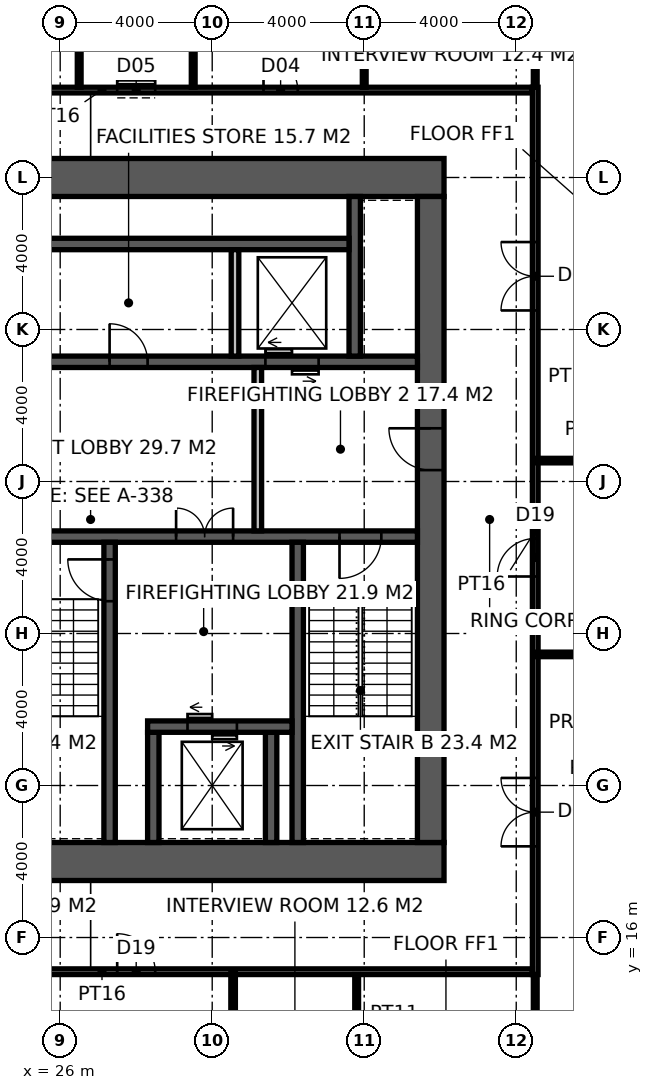
"""IFC4 building model, lengths in metres.
Left out: names, types, materials, properties, quantities, classifications, styles, units other than length and angle.
Written with IfcOpenShell. Run it as: python <this file> out.ifc"""

import sys

from ifc_helpers import new_model, si_unit, direction, frame, frame_2d, origin, place, context, subcontext, project, spatial, rectangle, extrude, element, fill, save


model = new_model("IFC4")
c1 = context("Model", 3, precision=1e-05, world=origin(), true_north=direction((0.0, 1.0)))
c2 = subcontext(c1, "Body", "Model", "MODEL_VIEW")
j1 = project(units=[si_unit("LENGTHUNIT", "METRE"), si_unit("PLANEANGLEUNIT", "RADIAN")], contexts=[c1])
p1 = place(None, origin())
s1 = spatial("IfcSite", under=j1, at=p1, CompositionType="ELEMENT")
p2 = place(p1, origin())
s2 = spatial("IfcBuilding", under=s1, at=p2, CompositionType="ELEMENT")
p3 = place(p2, frame((0.0, 0.0, 238.2)))
s3 = spatial("IfcBuildingStorey", under=s2, at=p3, CompositionType="ELEMENT", Elevation=238.2)
p4 = place(p3, frame((18.5, 18.0, -0.15), z_axis=(0.0, 0.0, 1.0), x_axis=(1.0, 0.0, 0.0)))
e1 = element("IfcWall", 1, at=p4, inside=s3, PredefinedType="SHEAR", context=c2, shape_type="SweptSolid", body=[
    extrude(rectangle(XDim=17.6, YDim=1.0, at=frame_2d((8.8, 0.0))), origin(), (0.0, 0.0, 1.0), 4.0),
])
p5 = place(p4, frame((3.45, 0.0, 0.15)))
e2 = element("IfcOpeningElement", 2, at=p5, cuts=e1, PredefinedType="OPENING", context=c2, shape_type="SweptSolid", body=[
    extrude(rectangle(XDim=1.5, YDim=2.4, at=frame_2d((0.75, 1.2))), frame((0.0, 0.51, 0.0), z_axis=(0.0, -1.0, 0.0), x_axis=(1.0, 0.0, 0.0)), (0.0, 0.0, 1.0), 1.02),
])
p6 = place(p3, frame((18.5, 36.0, -0.15), z_axis=(0.0, 0.0, 1.0), x_axis=(1.0, 0.0, 0.0)))
e3 = element("IfcWall", 3, at=p6, inside=s3, PredefinedType="SHEAR", context=c2, shape_type="SweptSolid", body=[
    extrude(rectangle(XDim=17.6, YDim=1.0, at=frame_2d((8.8, 0.0))), origin(), (0.0, 0.0, 1.0), 4.0),
])
p7 = place(p3, frame((35.75, 18.5, -0.15), z_axis=(0.0, 0.0, 1.0), x_axis=(0.0, 1.0, 0.0)))
e4 = element("IfcWall", 4, at=p7, inside=s3, PredefinedType="SHEAR", context=c2, shape_type="SweptSolid", body=[
    extrude(rectangle(XDim=17.0, YDim=0.7, at=frame_2d((8.5, 0.0))), origin(), (0.0, 0.0, 1.0), 4.0),
])
p8 = place(p7, frame((9.8, 0.0, 0.15)))
e5 = element("IfcOpeningElement", 5, at=p8, cuts=e4, PredefinedType="OPENING", context=c2, shape_type="SweptSolid", body=[
    extrude(rectangle(XDim=1.1, YDim=2.2, at=frame_2d((0.55, 1.1))), frame((0.0, 0.36, 0.0), z_axis=(0.0, -1.0, 0.0), x_axis=(1.0, 0.0, 0.0)), (0.0, 0.0, 1.0), 0.72),
])
p9 = place(p3, frame((24.15, 26.55, -0.15), z_axis=(0.0, 0.0, 1.0), x_axis=(1.0, 0.0, 0.0)))
e6 = element("IfcWall", 6, at=p9, inside=s3, PredefinedType="SHEAR", context=c2, shape_type="SweptSolid", body=[
    extrude(rectangle(XDim=11.25, YDim=0.3, at=frame_2d((5.625, 0.0))), origin(), (0.0, 0.0, 1.0), 4.0),
])
p10 = place(p9, frame((9.2, 0.0, 0.15)))
e7 = element("IfcOpeningElement", 7, at=p10, cuts=e6, PredefinedType="OPENING", context=c2, shape_type="SweptSolid", body=[
    extrude(rectangle(XDim=1.1, YDim=2.2, at=frame_2d((0.55, 1.1))), frame((0.0, 0.16, 0.0), z_axis=(0.0, -1.0, 0.0), x_axis=(1.0, 0.0, 0.0)), (0.0, 0.0, 1.0), 0.32),
])
p11 = place(p9, frame((4.9, 0.0, 0.15)))
e8 = element("IfcOpeningElement", 8, at=p11, cuts=e6, PredefinedType="OPENING", context=c2, shape_type="SweptSolid", body=[
    extrude(rectangle(XDim=1.5, YDim=2.4, at=frame_2d((0.75, 1.2))), frame((0.0, 0.16, 0.0), z_axis=(0.0, -1.0, 0.0), x_axis=(1.0, 0.0, 0.0)), (0.0, 0.0, 1.0), 0.32),
])
p12 = place(p3, frame((27.3, 18.5, -0.15), z_axis=(0.0, 0.0, 1.0), x_axis=(0.0, 1.0, 0.0)))
e9 = element("IfcWall", 9, at=p12, inside=s3, PredefinedType="SHEAR", context=c2, shape_type="SweptSolid", body=[
    extrude(rectangle(XDim=7.9, YDim=0.3, at=frame_2d((3.95, 0.0))), origin(), (0.0, 0.0, 1.0), 4.0),
])
p13 = place(p12, frame((6.35, 0.0, 0.15)))
e10 = element("IfcOpeningElement", 10, at=p13, cuts=e9, PredefinedType="OPENING", context=c2, shape_type="SweptSolid", body=[
    extrude(rectangle(XDim=1.1, YDim=2.2, at=frame_2d((0.55, 1.1))), frame((0.0, 0.16, 0.0), z_axis=(0.0, -1.0, 0.0), x_axis=(1.0, 0.0, 0.0)), (0.0, 0.0, 1.0), 0.32),
])
p14 = place(p3, frame((32.25, 18.5, -0.15), z_axis=(0.0, 0.0, 1.0), x_axis=(0.0, 1.0, 0.0)))
e11 = element("IfcWall", 11, at=p14, inside=s3, PredefinedType="SHEAR", context=c2, shape_type="SweptSolid", body=[
    extrude(rectangle(XDim=7.9, YDim=0.3, at=frame_2d((3.95, 0.0))), origin(), (0.0, 0.0, 1.0), 4.0),
])
for number, where, z_axis, x_axis in (
    (12, (28.45, 18.5, -0.15), (0.0, 0.0, 1.0), (0.0, 1.0, 0.0)),
    (13, (31.55, 18.5, -0.15), (0.0, 0.0, 1.0), (0.0, 1.0, 0.0)),
):
    element("IfcWall", number, at=place(p3, frame(where, z_axis=z_axis, x_axis=x_axis)), inside=s3, PredefinedType="SHEAR", context=c2, shape_type="SweptSolid", body=[
        extrude(rectangle(XDim=2.9, YDim=0.3, at=frame_2d((1.45, 0.0))), origin(), (0.0, 0.0, 1.0), 4.0),
    ])
p15 = place(p3, frame((28.3, 21.55, -0.15), z_axis=(0.0, 0.0, 1.0), x_axis=(1.0, 0.0, 0.0)))
e14 = element("IfcWall", 14, at=p15, inside=s3, PredefinedType="SHEAR", context=c2, shape_type="SweptSolid", body=[
    extrude(rectangle(XDim=3.8, YDim=0.3, at=frame_2d((1.9, 0.0))), origin(), (0.0, 0.0, 1.0), 4.0),
])
p16 = place(p15, frame((1.05, 0.0, 0.15)))
e15 = element("IfcOpeningElement", 15, at=p16, cuts=e14, PredefinedType="OPENING", context=c2, shape_type="SweptSolid", body=[
    extrude(rectangle(XDim=1.3, YDim=2.4, at=frame_2d((0.65, 1.2))), frame((0.0, 0.16, 0.0), z_axis=(0.0, -1.0, 0.0), x_axis=(1.0, 0.0, 0.0)), (0.0, 0.0, 1.0), 0.32),
])
p17 = place(p3, frame((24.15, 31.15, -0.15), z_axis=(0.0, 0.0, 1.0), x_axis=(1.0, 0.0, 0.0)))
e16 = element("IfcWall", 16, at=p17, inside=s3, PredefinedType="SHEAR", context=c2, shape_type="SweptSolid", body=[
    extrude(rectangle(XDim=11.25, YDim=0.3, at=frame_2d((5.625, 0.0))), origin(), (0.0, 0.0, 1.0), 4.0),
])
p18 = place(p17, frame((3.15, 0.0, 0.15)))
e17 = element("IfcOpeningElement", 17, at=p18, cuts=e16, PredefinedType="OPENING", context=c2, shape_type="SweptSolid", body=[
    extrude(rectangle(XDim=1.0, YDim=2.2, at=frame_2d((0.5, 1.1))), frame((0.0, 0.16, 0.0), z_axis=(0.0, -1.0, 0.0), x_axis=(1.0, 0.0, 0.0)), (0.0, 0.0, 1.0), 0.32),
])
p19 = place(p17, frame((7.25, 0.0, 0.15)))
e18 = element("IfcOpeningElement", 18, at=p19, cuts=e16, PredefinedType="OPENING", context=c2, shape_type="SweptSolid", body=[
    extrude(rectangle(XDim=1.4, YDim=2.4, at=frame_2d((0.7, 1.2))), frame((0.0, 0.16, 0.0), z_axis=(0.0, -1.0, 0.0), x_axis=(1.0, 0.0, 0.0)), (0.0, 0.0, 1.0), 0.32),
])
p20 = place(p3, frame((33.75, 31.3, -0.15), z_axis=(0.0, 0.0, 1.0), x_axis=(0.0, 1.0, 0.0)))
e19 = element("IfcWall", 19, at=p20, inside=s3, PredefinedType="SHEAR", context=c2, shape_type="SweptSolid", body=[
    extrude(rectangle(XDim=4.2, YDim=0.3, at=frame_2d((2.1, 0.0))), origin(), (0.0, 0.0, 1.0), 4.0),
])
p21 = place(p3, frame((25.0, 34.25, -0.15), z_axis=(0.0, 0.0, 1.0), x_axis=(1.0, 0.0, 0.0)))
e20 = element("IfcWall", 20, at=p21, inside=s3, PredefinedType="SHEAR", context=c2, shape_type="SweptSolid", body=[
    extrude(rectangle(XDim=8.6, YDim=0.3, at=frame_2d((4.3, 0.0))), origin(), (0.0, 0.0, 1.0), 4.0),
])
p22 = place(p3, frame((30.6, 31.3, -0.15), z_axis=(0.0, 0.0, 1.0), x_axis=(0.0, 1.0, 0.0)))
e21 = element("IfcWall", 21, at=p22, inside=s3, PredefinedType="SOLIDWALL", context=c2, shape_type="SweptSolid", body=[
    extrude(rectangle(XDim=2.8, YDim=0.2, at=frame_2d((1.4, 0.0))), origin(), (0.0, 0.0, 1.0), 4.0),
])
p23 = place(p3, frame((31.2, 26.7, 0.0), z_axis=(0.0, 0.0, 1.0), x_axis=(0.0, 1.0, 0.0)))
e22 = element("IfcWall", 22, at=p23, inside=s3, PredefinedType="SOLIDWALL", context=c2, shape_type="SweptSolid", body=[
    extrude(rectangle(XDim=4.3, YDim=0.2, at=frame_2d((2.15, 0.0))), origin(), (0.0, 0.0, 1.0), 3.85),
])
p24 = place(p3, frame((38.5, 15.025, 0.0), z_axis=(0.0, 0.0, 1.0), x_axis=(0.0, 1.0, 0.0)))
e23 = element("IfcWall", 23, at=p24, inside=s3, PredefinedType="PARTITIONING", context=c2, shape_type="SweptSolid", body=[
    extrude(rectangle(XDim=23.35, YDim=0.15, at=frame_2d((11.675, 0.0))), origin(), (0.0, 0.0, 1.0), 2.65),
])
p25 = place(p24, frame((3.374, 0.0, 0.0)))
e24 = element("IfcOpeningElement", 24, at=p25, cuts=e23, PredefinedType="OPENING", context=c2, shape_type="SweptSolid", body=[
    extrude(rectangle(XDim=1.8, YDim=2.4, at=frame_2d((0.9, 1.2))), frame((0.0, 0.085, 0.0), z_axis=(0.0, -1.0, 0.0), x_axis=(1.0, 0.0, 0.0)), (0.0, 0.0, 1.0), 0.17),
])
p26 = place(p24, frame((17.476, 0.0, 0.0)))
e25 = element("IfcOpeningElement", 25, at=p26, cuts=e23, PredefinedType="OPENING", context=c2, shape_type="SweptSolid", body=[
    extrude(rectangle(XDim=1.8, YDim=2.4, at=frame_2d((0.9, 1.2))), frame((0.0, 0.085, 0.0), z_axis=(0.0, -1.0, 0.0), x_axis=(1.0, 0.0, 0.0)), (0.0, 0.0, 1.0), 0.17),
])
p27 = place(p24, frame((10.475, 0.0, 0.0)))
e26 = element("IfcOpeningElement", 26, at=p27, cuts=e23, PredefinedType="OPENING", context=c2, shape_type="SweptSolid", body=[
    extrude(rectangle(XDim=1.0, YDim=2.2, at=frame_2d((0.5, 1.1))), frame((0.0, 0.085, 0.0), z_axis=(0.0, -1.0, 0.0), x_axis=(1.0, 0.0, 0.0)), (0.0, 0.0, 1.0), 0.17),
])
p28 = place(p3, frame((15.775, 15.1, 0.0), z_axis=(0.0, 0.0, 1.0), x_axis=(1.0, 0.0, 0.0)))
e27 = element("IfcWall", 27, at=p28, inside=s3, PredefinedType="PARTITIONING", context=c2, shape_type="SweptSolid", body=[
    extrude(rectangle(XDim=22.65, YDim=0.15, at=frame_2d((11.325, 0.0))), origin(), (0.0, 0.0, 1.0), 3.85),
])
p29 = place(p28, frame((11.725, 0.0, 0.0)))
e28 = element("IfcOpeningElement", 28, at=p29, cuts=e27, PredefinedType="OPENING", context=c2, shape_type="SweptSolid", body=[
    extrude(rectangle(XDim=1.0, YDim=2.2, at=frame_2d((0.5, 1.1))), frame((0.0, 0.085, 0.0), z_axis=(0.0, -1.0, 0.0), x_axis=(1.0, 0.0, 0.0)), (0.0, 0.0, 1.0), 0.17),
])
p30 = place(p3, frame((15.775, 38.3, 0.0), z_axis=(0.0, 0.0, 1.0), x_axis=(1.0, 0.0, 0.0)))
e29 = element("IfcWall", 29, at=p30, inside=s3, PredefinedType="PARTITIONING", context=c2, shape_type="SweptSolid", body=[
    extrude(rectangle(XDim=22.65, YDim=0.15, at=frame_2d((11.325, 0.0))), origin(), (0.0, 0.0, 1.0), 3.85),
])
p31 = place(p30, frame((7.975, 0.0, 0.0)))
e30 = element("IfcOpeningElement", 30, at=p31, cuts=e29, PredefinedType="OPENING", context=c2, shape_type="SweptSolid", body=[
    extrude(rectangle(XDim=0.9, YDim=2.1, at=frame_2d((0.45, 1.05))), frame((0.0, 0.085, 0.0), z_axis=(0.0, -1.0, 0.0), x_axis=(1.0, 0.0, 0.0)), (0.0, 0.0, 1.0), 0.17),
])
p32 = place(p30, frame((11.725, 0.0, 0.0)))
e31 = element("IfcOpeningElement", 31, at=p32, cuts=e29, PredefinedType="OPENING", context=c2, shape_type="SweptSolid", body=[
    extrude(rectangle(XDim=1.0, YDim=2.1, at=frame_2d((0.5, 1.05))), frame((0.0, 0.085, 0.0), z_axis=(0.0, -1.0, 0.0), x_axis=(1.0, 0.0, 0.0)), (0.0, 0.0, 1.0), 0.17),
])
p33 = place(p30, frame((15.575, 0.0, 0.0)))
e32 = element("IfcOpeningElement", 32, at=p33, cuts=e29, PredefinedType="OPENING", context=c2, shape_type="SweptSolid", body=[
    extrude(rectangle(XDim=0.9, YDim=2.1, at=frame_2d((0.45, 1.05))), frame((0.0, 0.085, 0.0), z_axis=(0.0, -1.0, 0.0), x_axis=(1.0, 0.0, 0.0)), (0.0, 0.0, 1.0), 0.17),
])
p34 = place(p3, frame((34.0, 38.375, 0.0), z_axis=(0.0, 0.0, 1.0), x_axis=(0.0, 1.0, 0.0)))
e33 = element("IfcWall", 33, at=p34, inside=s3, PredefinedType="PARTITIONING", context=c2, shape_type="SweptSolid", body=[
    extrude(rectangle(XDim=3.675, YDim=0.1, at=frame_2d((1.837, 0.0))), origin(), (0.0, 0.0, 1.0), 2.65),
])
for number, where, z_axis, x_axis in (
    (34, (26.5, 38.375, 0.0), (0.0, 0.0, 1.0), (0.0, 1.0, 0.0)),
    (35, (29.5, 38.375, 0.0), (0.0, 0.0, 1.0), (0.0, 1.0, 0.0)),
):
    element("IfcWall", number, at=place(p3, frame(where, z_axis=z_axis, x_axis=x_axis)), inside=s3, PredefinedType="PARTITIONING", context=c2, shape_type="SweptSolid", body=[
        extrude(rectangle(XDim=3.575, YDim=0.1, at=frame_2d((1.788, 0.0))), origin(), (0.0, 0.0, 1.0), 2.65),
    ])
p35 = place(p3, frame((30.55, 4.68, 0.0), z_axis=(0.0, 0.0, 1.0), x_axis=(0.0, 1.0, 0.0)))
e36 = element("IfcWall", 36, at=p35, inside=s3, PredefinedType="PARTITIONING", context=c2, shape_type="SweptSolid", body=[
    extrude(rectangle(XDim=10.42, YDim=0.12, at=frame_2d((5.21, 0.0))), origin(), (0.0, 0.0, 1.0), 3.85),
])
for number, where, z_axis, x_axis in (
    (37, (38.5, 23.45, 0.0), (0.0, 0.0, 1.0), (1.0, 0.0, 0.0)),
    (38, (38.5, 28.55, 0.0), (0.0, 0.0, 1.0), (1.0, 0.0, 0.0)),
):
    element("IfcWall", number, at=place(p3, frame(where, z_axis=z_axis, x_axis=x_axis)), inside=s3, PredefinedType="PARTITIONING", context=c2, shape_type="SweptSolid", body=[
        extrude(rectangle(XDim=10.82, YDim=0.12, at=frame_2d((5.41, 0.0))), origin(), (0.0, 0.0, 1.0), 2.65),
    ])
p36 = place(p3, frame((33.801, 10.95, 0.0), z_axis=(0.0, 0.0, 1.0), x_axis=(0.0, 1.0, 0.0)))
e39 = element("IfcWall", 39, at=p36, inside=s3, PredefinedType="PARTITIONING", context=c2, shape_type="SweptSolid", body=[
    extrude(rectangle(XDim=4.075, YDim=0.1, at=frame_2d((2.038, 0.0))), origin(), (0.0, 0.0, 1.0), 2.95),
])
p37 = place(p3, frame((38.5, 10.95, 0.0), z_axis=(0.0, 0.0, 1.0), x_axis=(0.0, 1.0, 0.0)))
e40 = element("IfcWall", 40, at=p37, inside=s3, PredefinedType="PARTITIONING", context=c2, shape_type="SweptSolid", body=[
    extrude(rectangle(XDim=4.075, YDim=0.1, at=frame_2d((2.038, 0.0))), origin(), (0.0, 0.0, 1.0), 2.65),
])
p38 = place(p3, frame((38.5, 38.375, 0.0), z_axis=(0.0, 0.0, 1.0), x_axis=(0.0, 1.0, 0.0)))
e41 = element("IfcWall", 41, at=p38, inside=s3, PredefinedType="PARTITIONING", context=c2, shape_type="SweptSolid", body=[
    extrude(rectangle(XDim=2.875, YDim=0.1, at=frame_2d((1.438, 0.0))), origin(), (0.0, 0.0, 1.0), 2.65),
])
p39 = place(p13, origin())
e42 = element("IfcDoor", 42, at=p39, inside=s3, OperationType="SINGLE_SWING_RIGHT", PredefinedType="DOOR", context=c2, shape_type="SweptSolid", body=[
    extrude(rectangle(XDim=1.1, YDim=2.2, at=frame_2d((0.55, 1.1))), frame((0.0, 0.025, 0.0), z_axis=(0.0, -1.0, 0.0), x_axis=(1.0, 0.0, 0.0)), (0.0, 0.0, 1.0), 0.05),
])
fill(e10, e42)
p40 = place(p10, frame((1.1, 0.0, 0.0), z_axis=(0.0, 0.0, 1.0), x_axis=(-1.0, 0.0, 0.0)))
e43 = element("IfcDoor", 43, at=p40, inside=s3, OperationType="SINGLE_SWING_RIGHT", PredefinedType="DOOR", context=c2, shape_type="SweptSolid", body=[
    extrude(rectangle(XDim=1.1, YDim=2.2, at=frame_2d((0.55, 1.1))), frame((0.0, 0.025, 0.0), z_axis=(0.0, -1.0, 0.0), x_axis=(1.0, 0.0, 0.0)), (0.0, 0.0, 1.0), 0.05),
])
fill(e7, e43)
p41 = place(p8, origin())
e44 = element("IfcDoor", 44, at=p41, inside=s3, OperationType="SINGLE_SWING_RIGHT", PredefinedType="DOOR", context=c2, shape_type="SweptSolid", body=[
    extrude(rectangle(XDim=1.1, YDim=2.2, at=frame_2d((0.55, 1.1))), frame((0.0, 0.025, 0.0), z_axis=(0.0, -1.0, 0.0), x_axis=(1.0, 0.0, 0.0)), (0.0, 0.0, 1.0), 0.05),
])
fill(e5, e44)
p42 = place(p11, origin())
e45 = element("IfcDoor", 45, at=p42, inside=s3, OperationType="DOUBLE_DOOR_DOUBLE_SWING", PredefinedType="DOOR", context=c2, shape_type="SweptSolid", body=[
    extrude(rectangle(XDim=1.5, YDim=2.4, at=frame_2d((0.75, 1.2))), frame((0.0, 0.025, 0.0), z_axis=(0.0, -1.0, 0.0), x_axis=(1.0, 0.0, 0.0)), (0.0, 0.0, 1.0), 0.05),
])
fill(e8, e45)
p43 = place(p18, origin())
e46 = element("IfcDoor", 46, at=p43, inside=s3, OperationType="SINGLE_SWING_LEFT", PredefinedType="DOOR", context=c2, shape_type="SweptSolid", body=[
    extrude(rectangle(XDim=1.0, YDim=2.2, at=frame_2d((0.5, 1.1))), frame((0.0, 0.025, 0.0), z_axis=(0.0, -1.0, 0.0), x_axis=(1.0, 0.0, 0.0)), (0.0, 0.0, 1.0), 0.05),
])
fill(e17, e46)
p44 = place(p32, origin())
e47 = element("IfcDoor", 47, at=p44, inside=s3, OperationType="SLIDING_TO_LEFT", PredefinedType="DOOR", context=c2, shape_type="SweptSolid", body=[
    extrude(rectangle(XDim=1.0, YDim=2.1, at=frame_2d((0.5, 1.05))), frame((0.0, 0.025, 0.0), z_axis=(0.0, -1.0, 0.0), x_axis=(1.0, 0.0, 0.0)), (0.0, 0.0, 1.0), 0.05),
])
fill(e31, e47)
p45 = place(p33, origin())
e48 = element("IfcDoor", 48, at=p45, inside=s3, OperationType="SINGLE_SWING_LEFT", PredefinedType="DOOR", context=c2, shape_type="SweptSolid", body=[
    extrude(rectangle(XDim=0.9, YDim=2.1, at=frame_2d((0.45, 1.05))), frame((0.0, 0.025, 0.0), z_axis=(0.0, -1.0, 0.0), x_axis=(1.0, 0.0, 0.0)), (0.0, 0.0, 1.0), 0.05),
])
fill(e32, e48)
p46 = place(p25, origin())
e49 = element("IfcDoor", 49, at=p46, inside=s3, OperationType="DOUBLE_DOOR_DOUBLE_SWING", PredefinedType="DOOR", context=c2, shape_type="SweptSolid", body=[
    extrude(rectangle(XDim=1.8, YDim=2.4, at=frame_2d((0.9, 1.2))), frame((0.0, 0.025, 0.0), z_axis=(0.0, -1.0, 0.0), x_axis=(1.0, 0.0, 0.0)), (0.0, 0.0, 1.0), 0.05),
])
fill(e24, e49)
p47 = place(p26, origin())
e50 = element("IfcDoor", 50, at=p47, inside=s3, OperationType="DOUBLE_DOOR_DOUBLE_SWING", PredefinedType="DOOR", context=c2, shape_type="SweptSolid", body=[
    extrude(rectangle(XDim=1.8, YDim=2.4, at=frame_2d((0.9, 1.2))), frame((0.0, 0.025, 0.0), z_axis=(0.0, -1.0, 0.0), x_axis=(1.0, 0.0, 0.0)), (0.0, 0.0, 1.0), 0.05),
])
fill(e25, e50)
p48 = place(p29, origin())
e51 = element("IfcDoor", 51, at=p48, inside=s3, OperationType="SINGLE_SWING_LEFT", PredefinedType="DOOR", context=c2, shape_type="SweptSolid", body=[
    extrude(rectangle(XDim=1.0, YDim=2.2, at=frame_2d((0.5, 1.1))), frame((0.0, 0.025, 0.0), z_axis=(0.0, -1.0, 0.0), x_axis=(1.0, 0.0, 0.0)), (0.0, 0.0, 1.0), 0.05),
])
fill(e28, e51)
p49 = place(p27, origin())
e52 = element("IfcDoor", 52, at=p49, inside=s3, OperationType="SINGLE_SWING_LEFT", PredefinedType="DOOR", context=c2, shape_type="SweptSolid", body=[
    extrude(rectangle(XDim=1.0, YDim=2.2, at=frame_2d((0.5, 1.1))), frame((0.0, 0.025, 0.0), z_axis=(0.0, -1.0, 0.0), x_axis=(1.0, 0.0, 0.0)), (0.0, 0.0, 1.0), 0.05),
])
fill(e26, e52)
p50 = place(p16, origin())
e53 = element("IfcDoor", 53, at=p50, inside=s3, OperationType="DOUBLE_DOOR_SLIDING", PredefinedType="DOOR", context=c2, shape_type="SweptSolid", body=[
    extrude(rectangle(XDim=1.3, YDim=2.4, at=frame_2d((0.65, 1.2))), frame((0.0, 0.025, 0.0), z_axis=(0.0, -1.0, 0.0), x_axis=(1.0, 0.0, 0.0)), (0.0, 0.0, 1.0), 0.05),
])
fill(e15, e53)
p51 = place(p19, origin())
e54 = element("IfcDoor", 54, at=p51, inside=s3, OperationType="DOUBLE_DOOR_SLIDING", PredefinedType="DOOR", context=c2, shape_type="SweptSolid", body=[
    extrude(rectangle(XDim=1.4, YDim=2.4, at=frame_2d((0.7, 1.2))), frame((0.0, 0.025, 0.0), z_axis=(0.0, -1.0, 0.0), x_axis=(1.0, 0.0, 0.0)), (0.0, 0.0, 1.0), 0.05),
])
fill(e18, e54)
save(model, sys.argv[1])
